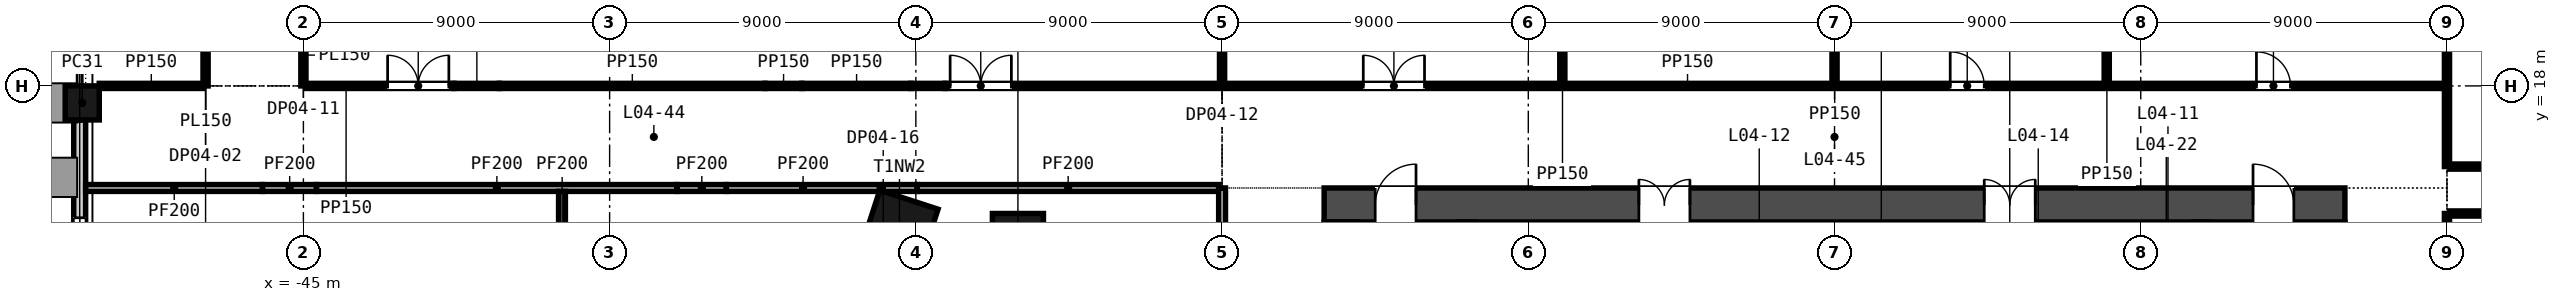
"""IFC4 building model, lengths in metres.
Left out: names, types, materials, properties, quantities, classifications, styles, units other than length and angle.
Written with IfcOpenShell. Run it as: python <this file> out.ifc"""

import sys

from ifc_helpers import new_model, si_unit, direction, frame, frame_2d, origin, origin_2d, place, context, subcontext, project, spatial, rectangle, extrude, element, fill, save


model = new_model("IFC4")
c1 = context("Model", 3, precision=1e-05, world=origin(), true_north=direction((0.0, 1.0)))
c2 = subcontext(c1, "Body", "Model", "MODEL_VIEW")
j1 = project(units=[si_unit("LENGTHUNIT", "METRE"), si_unit("PLANEANGLEUNIT", "RADIAN")], contexts=[c1])
p1 = place(None, origin())
s1 = spatial("IfcSite", under=j1, at=p1, CompositionType="ELEMENT")
p2 = place(p1, origin())
s2 = spatial("IfcBuilding", under=s1, at=p2, CompositionType="ELEMENT")
p3 = place(p2, frame((0.0, 0.0, 27.0)))
s3 = spatial("IfcBuildingStorey", under=s2, at=p3, CompositionType="ELEMENT", Elevation=27.0)
p4 = place(p3, frame((-15.0, 14.5, -0.3), z_axis=(0.0, 0.0, 1.0), x_axis=(1.0, 0.0, 0.0)))
e1 = element("IfcWall", 1, at=p4, inside=s3, PredefinedType="SOLIDWALL", context=c2, shape_type="SweptSolid", body=[
    extrude(rectangle(XDim=30.0, YDim=1.0, at=frame_2d((15.0, 0.0))), origin(), (0.0, 0.0, 1.0), 4.5),
])
p5 = place(p4, frame((9.25, 0.0, 0.3)))
e2 = element("IfcOpeningElement", 2, at=p5, cuts=e1, PredefinedType="OPENING", context=c2, shape_type="SweptSolid", body=[
    extrude(rectangle(XDim=1.5, YDim=2.1, at=frame_2d((0.75, 1.05))), frame((0.0, 0.51, 0.0), z_axis=(0.0, -1.0, 0.0), x_axis=(1.0, 0.0, 0.0)), (0.0, 0.0, 1.0), 1.02),
])
p6 = place(p4, frame((19.4, 0.0, 0.3)))
e3 = element("IfcOpeningElement", 3, at=p6, cuts=e1, PredefinedType="OPENING", context=c2, shape_type="SweptSolid", body=[
    extrude(rectangle(XDim=1.5, YDim=2.1, at=frame_2d((0.75, 1.05))), frame((0.0, 0.51, 0.0), z_axis=(0.0, -1.0, 0.0), x_axis=(1.0, 0.0, 0.0)), (0.0, 0.0, 1.0), 1.02),
])
p7 = place(p4, frame((1.5, 0.0, 0.3)))
e4 = element("IfcOpeningElement", 4, at=p7, cuts=e1, PredefinedType="OPENING", context=c2, shape_type="SweptSolid", body=[
    extrude(rectangle(XDim=1.2, YDim=2.1, at=frame_2d((0.6, 1.05))), frame((0.0, 0.51, 0.0), z_axis=(0.0, -1.0, 0.0), x_axis=(1.0, 0.0, 0.0)), (0.0, 0.0, 1.0), 1.02),
])
p8 = place(p4, frame((27.3, 0.0, 0.3)))
e5 = element("IfcOpeningElement", 5, at=p8, cuts=e1, PredefinedType="OPENING", context=c2, shape_type="SweptSolid", body=[
    extrude(rectangle(XDim=1.2, YDim=2.1, at=frame_2d((0.6, 1.05))), frame((0.0, 0.51, 0.0), z_axis=(0.0, -1.0, 0.0), x_axis=(1.0, 0.0, 0.0)), (0.0, 0.0, 1.0), 1.02),
])
p9 = place(p3, frame((-27.482, 13.799, -0.3), z_axis=(0.0, 0.0, 1.0), x_axis=(-0.309016994375, -0.951056516295, 0.0)))
e6 = element("IfcColumn", 6, at=p9, inside=s3, PredefinedType="COLUMN", context=c2, shape_type="SweptSolid", body=[
    extrude(rectangle(XDim=1.8, YDim=1.8, at=origin_2d()), origin(), (0.0, 0.0, 1.0), 4.5),
])
p10 = place(p3, frame((-24.0, 13.5, -0.3), z_axis=(0.0, 0.0, 1.0), x_axis=(1.0, 0.0, 0.0)))
e7 = element("IfcColumn", 7, at=p10, inside=s3, PredefinedType="COLUMN", context=c2, shape_type="SweptSolid", body=[
    extrude(rectangle(XDim=1.5, YDim=1.5, at=origin_2d()), origin(), (0.0, 0.0, 1.0), 4.5),
])
p11 = place(p3, frame((-51.5, 17.5, -0.3), z_axis=(0.0, 0.0, 1.0), x_axis=(0.0, -1.0, 0.0)))
e8 = element("IfcColumn", 8, at=p11, inside=s3, PredefinedType="COLUMN", context=c2, shape_type="SweptSolid", body=[
    extrude(rectangle(XDim=1.0, YDim=1.0, at=origin_2d()), origin(), (0.0, 0.0, 1.0), 4.5),
])
p12 = place(p3, frame((-51.575, 17.0, -0.3), z_axis=(0.0, 0.0, 1.0), x_axis=(0.0, -1.0, 0.0)))
e9 = element("IfcWall", 9, at=p12, inside=s3, PredefinedType="SOLIDWALL", context=c2, shape_type="SweptSolid", body=[
    extrude(rectangle(XDim=7.75, YDim=0.35, at=frame_2d((3.875, 0.0))), origin(), (0.0, 0.0, 1.0), 3.6),
])
p13 = place(p12, frame((2.875, 0.0, 1.2)))
e10 = element("IfcOpeningElement", 10, at=p13, cuts=e9, PredefinedType="OPENING", context=c2, shape_type="SweptSolid", body=[
    extrude(rectangle(XDim=2.0, YDim=2.35, at=frame_2d((1.0, 1.175))), frame((0.0, 0.185, 0.0), z_axis=(0.0, -1.0, 0.0), x_axis=(1.0, 0.0, 0.0)), (0.0, 0.0, 1.0), 0.37),
])
for number, where, z_axis, x_axis in (
    (11, (-8.275, 11.3, 0.0), (0.0, 0.0, 1.0), (0.0, 1.0, 0.0)),
    (12, (-5.875, 11.3, 0.0), (0.0, 0.0, 1.0), (0.0, 1.0, 0.0)),
    (13, (-4.125, 11.3, 0.0), (0.0, 0.0, 1.0), (0.0, 1.0, 0.0)),
    (14, (-1.325, 11.3, 0.0), (0.0, 0.0, 1.0), (0.0, 1.0, 0.0)),
    (15, (1.475, 11.3, 0.0), (0.0, 0.0, 1.0), (0.0, 1.0, 0.0)),
    (16, (4.275, 11.3, 0.0), (0.0, 0.0, 1.0), (0.0, 1.0, 0.0)),
    (17, (6.025, 11.3, 0.0), (0.0, 0.0, 1.0), (0.0, 1.0, 0.0)),
    (18, (8.825, 11.3, 0.0), (0.0, 0.0, 1.0), (0.0, 1.0, 0.0)),
):
    element("IfcWall", number, at=place(p3, frame(where, z_axis=z_axis, x_axis=x_axis)), inside=s3, PredefinedType="PARTITIONING", context=c2, shape_type="SweptSolid", body=[
        extrude(rectangle(XDim=2.7, YDim=0.25, at=frame_2d((1.35, 0.0))), origin(), (0.0, 0.0, 1.0), 4.2),
    ])
p14 = place(p3, frame((18.075, 14.25, 0.0), z_axis=(0.0, 0.0, 1.0), x_axis=(1.0, 0.0, 0.0)))
e19 = element("IfcWall", 19, at=p14, inside=s3, PredefinedType="PARTITIONING", context=c2, shape_type="SweptSolid", body=[
    extrude(rectangle(XDim=5.175, YDim=0.15, at=frame_2d((2.587, 0.0))), origin(), (0.0, 0.0, 1.0), 4.2),
])
p15 = place(p3, frame((-51.4, 15.0, 0.0), z_axis=(0.0, 0.0, 1.0), x_axis=(1.0, 0.0, 0.0)))
e20 = element("IfcWall", 20, at=p15, inside=s3, PredefinedType="PARTITIONING", context=c2, shape_type="SweptSolid", body=[
    extrude(rectangle(XDim=5.198, YDim=0.2, at=frame_2d((2.599, 0.0))), origin(), (0.0, 0.0, 1.0), 4.2),
])
p16 = place(p3, frame((-46.202, 15.0, 0.0), z_axis=(0.0, 0.0, 1.0), x_axis=(1.0, 0.0, 0.0)))
e21 = element("IfcWall", 21, at=p16, inside=s3, PredefinedType="PARTITIONING", context=c2, shape_type="SweptSolid", body=[
    extrude(rectangle(XDim=1.587, YDim=0.2, at=frame_2d((0.793, 0.0))), origin(), (0.0, 0.0, 1.0), 3.219),
])
p17 = place(p3, frame((-44.615, 15.0, 0.0), z_axis=(0.0, 0.0, 1.0), x_axis=(1.0, 0.0, 0.0)))
e22 = element("IfcWall", 22, at=p17, inside=s3, PredefinedType="PARTITIONING", context=c2, shape_type="SweptSolid", body=[
    extrude(rectangle(XDim=10.594, YDim=0.2, at=frame_2d((5.297, 0.0))), origin(), (0.0, 0.0, 1.0), 4.2),
])
p18 = place(p3, frame((-34.021, 15.0, 0.0), z_axis=(0.0, 0.0, 1.0), x_axis=(1.0, 0.0, 0.0)))
e23 = element("IfcWall", 23, at=p18, inside=s3, PredefinedType="PARTITIONING", context=c2, shape_type="SweptSolid", body=[
    extrude(rectangle(XDim=1.452, YDim=0.2, at=frame_2d((0.726, 0.0))), origin(), (0.0, 0.0, 1.0), 3.111),
])
p19 = place(p3, frame((-32.569, 15.0, 0.0), z_axis=(0.0, 0.0, 1.0), x_axis=(1.0, 0.0, 0.0)))
e24 = element("IfcWall", 24, at=p19, inside=s3, PredefinedType="PARTITIONING", context=c2, shape_type="SweptSolid", body=[
    extrude(rectangle(XDim=4.499, YDim=0.2, at=frame_2d((2.25, 0.0))), origin(), (0.0, 0.0, 1.0), 4.2),
])
p20 = place(p3, frame((-27.958, 15.0, 0.0), z_axis=(0.0, 0.0, 1.0), x_axis=(1.0, 0.0, 0.0)))
e25 = element("IfcWall", 25, at=p20, inside=s3, PredefinedType="PARTITIONING", context=c2, shape_type="SweptSolid", body=[
    extrude(rectangle(XDim=1.0, YDim=0.2, at=frame_2d((0.5, 0.0))), origin(), (0.0, 0.0, 1.0), 3.2),
])
p21 = place(p3, frame((-26.958, 15.0, 0.0), z_axis=(0.0, 0.0, 1.0), x_axis=(1.0, 0.0, 0.0)))
e26 = element("IfcWall", 26, at=p21, inside=s3, PredefinedType="PARTITIONING", context=c2, shape_type="SweptSolid", body=[
    extrude(rectangle(XDim=8.858, YDim=0.2, at=frame_2d((4.429, 0.0))), origin(), (0.0, 0.0, 1.0), 4.2),
])
p22 = place(p3, frame((18.075, 15.629, 0.0), z_axis=(0.0, 0.0, 1.0), x_axis=(1.0, 0.0, 0.0)))
e27 = element("IfcWall", 27, at=p22, inside=s3, PredefinedType="PARTITIONING", context=c2, shape_type="SweptSolid", body=[
    extrude(rectangle(XDim=7.482, YDim=0.15, at=frame_2d((3.741, 0.0))), origin(), (0.0, 0.0, 1.0), 4.2),
])
p23 = place(p3, frame((-51.0, 18.0, 0.0), z_axis=(0.0, 0.0, 1.0), x_axis=(1.0, 0.0, 0.0)))
e28 = element("IfcWall", 28, at=p23, inside=s3, PredefinedType="PARTITIONING", context=c2, shape_type="SweptSolid", body=[
    extrude(rectangle(XDim=3.05, YDim=0.15, at=frame_2d((1.525, 0.0))), origin(), (0.0, 0.0, 1.0), 4.2),
])
p24 = place(p3, frame((-44.925, 18.0, 0.0), z_axis=(0.0, 0.0, 1.0), x_axis=(1.0, 0.0, 0.0)))
e29 = element("IfcWall", 29, at=p24, inside=s3, PredefinedType="PARTITIONING", context=c2, shape_type="SweptSolid", body=[
    extrude(rectangle(XDim=4.353, YDim=0.15, at=frame_2d((2.176, 0.0))), origin(), (0.0, 0.0, 1.0), 4.2),
])
p25 = place(p24, frame((2.4, 0.0, 0.0)))
e30 = element("IfcOpeningElement", 30, at=p25, cuts=e29, PredefinedType="OPENING", context=c2, shape_type="SweptSolid", body=[
    extrude(rectangle(XDim=1.8, YDim=2.4, at=frame_2d((0.9, 1.2))), frame((0.0, 0.085, 0.0), z_axis=(0.0, -1.0, 0.0), x_axis=(1.0, 0.0, 0.0)), (0.0, 0.0, 1.0), 0.17),
])
p26 = place(p3, frame((-40.572, 18.0, 0.0), z_axis=(0.0, 0.0, 1.0), x_axis=(1.0, 0.0, 0.0)))
e31 = element("IfcWall", 31, at=p26, inside=s3, PredefinedType="PARTITIONING", context=c2, shape_type="SweptSolid", body=[
    extrude(rectangle(XDim=1.331, YDim=0.15, at=frame_2d((0.666, 0.0))), origin(), (0.0, 0.0, 1.0), 3.111),
])
p27 = place(p3, frame((-39.241, 18.0, 0.0), z_axis=(0.0, 0.0, 1.0), x_axis=(1.0, 0.0, 0.0)))
e32 = element("IfcWall", 32, at=p27, inside=s3, PredefinedType="PARTITIONING", context=c2, shape_type="SweptSolid", body=[
    extrude(rectangle(XDim=7.807, YDim=0.15, at=frame_2d((3.903, 0.0))), origin(), (0.0, 0.0, 1.0), 4.2),
])
p28 = place(p3, frame((-31.434, 18.0, 0.0), z_axis=(0.0, 0.0, 1.0), x_axis=(1.0, 0.0, 0.0)))
e33 = element("IfcWall", 33, at=p28, inside=s3, PredefinedType="PARTITIONING", context=c2, shape_type="SweptSolid", body=[
    extrude(rectangle(XDim=1.083, YDim=0.15, at=frame_2d((0.542, 0.0))), origin(), (0.0, 0.0, 1.0), 3.111),
])
p29 = place(p3, frame((-30.351, 18.0, 0.0), z_axis=(0.0, 0.0, 1.0), x_axis=(1.0, 0.0, 0.0)))
e34 = element("IfcWall", 34, at=p29, inside=s3, PredefinedType="PARTITIONING", context=c2, shape_type="SweptSolid", body=[
    extrude(rectangle(XDim=3.209, YDim=0.15, at=frame_2d((1.604, 0.0))), origin(), (0.0, 0.0, 1.0), 4.2),
])
p30 = place(p3, frame((-27.142, 18.0, 0.0), z_axis=(0.0, 0.0, 1.0), x_axis=(1.0, 0.0, 0.0)))
e35 = element("IfcWall", 35, at=p30, inside=s3, PredefinedType="PARTITIONING", context=c2, shape_type="SweptSolid", body=[
    extrude(rectangle(XDim=1.0, YDim=0.15, at=frame_2d((0.5, 0.0))), origin(), (0.0, 0.0, 1.0), 3.2),
])
p31 = place(p3, frame((-26.142, 18.0, 0.0), z_axis=(0.0, 0.0, 1.0), x_axis=(1.0, 0.0, 0.0)))
e36 = element("IfcWall", 36, at=p31, inside=s3, PredefinedType="PARTITIONING", context=c2, shape_type="SweptSolid", body=[
    extrude(rectangle(XDim=44.067, YDim=0.15, at=frame_2d((22.034, 0.0))), origin(), (0.0, 0.0, 1.0), 4.2),
])
p32 = place(p31, frame((0.15, 0.0, 0.0)))
e37 = element("IfcOpeningElement", 37, at=p32, cuts=e36, PredefinedType="OPENING", context=c2, shape_type="SweptSolid", body=[
    extrude(rectangle(XDim=1.8, YDim=2.4, at=frame_2d((0.9, 1.2))), frame((0.0, 0.085, 0.0), z_axis=(0.0, -1.0, 0.0), x_axis=(1.0, 0.0, 0.0)), (0.0, 0.0, 1.0), 0.17),
])
p33 = place(p31, frame((12.292, 0.0, 0.0)))
e38 = element("IfcOpeningElement", 38, at=p33, cuts=e36, PredefinedType="OPENING", context=c2, shape_type="SweptSolid", body=[
    extrude(rectangle(XDim=1.8, YDim=2.4, at=frame_2d((0.9, 1.2))), frame((0.0, 0.085, 0.0), z_axis=(0.0, -1.0, 0.0), x_axis=(1.0, 0.0, 0.0)), (0.0, 0.0, 1.0), 0.17),
])
p34 = place(p31, frame((29.542, 0.0, 0.0)))
e39 = element("IfcOpeningElement", 39, at=p34, cuts=e36, PredefinedType="OPENING", context=c2, shape_type="SweptSolid", body=[
    extrude(rectangle(XDim=1.0, YDim=2.1, at=frame_2d((0.5, 1.05))), frame((0.0, 0.085, 0.0), z_axis=(0.0, -1.0, 0.0), x_axis=(1.0, 0.0, 0.0)), (0.0, 0.0, 1.0), 0.17),
])
p35 = place(p31, frame((38.542, 0.0, 0.0)))
e40 = element("IfcOpeningElement", 40, at=p35, cuts=e36, PredefinedType="OPENING", context=c2, shape_type="SweptSolid", body=[
    extrude(rectangle(XDim=1.0, YDim=2.1, at=frame_2d((0.5, 1.05))), frame((0.0, 0.085, 0.0), z_axis=(0.0, -1.0, 0.0), x_axis=(1.0, 0.0, 0.0)), (0.0, 0.0, 1.0), 0.17),
])
p36 = place(p3, frame((-47.875, 18.0, 0.0), z_axis=(0.0, 0.0, 1.0), x_axis=(0.0, 1.0, 0.0)))
e41 = element("IfcWall", 41, at=p36, inside=s3, PredefinedType="PARTITIONING", context=c2, shape_type="SweptSolid", body=[
    extrude(rectangle(XDim=3.116, YDim=0.15, at=frame_2d((1.558, 0.0))), origin(), (0.0, 0.0, 1.0), 4.2),
])
p37 = place(p3, frame((-45.0, 18.0, 0.0), z_axis=(0.0, 0.0, 1.0), x_axis=(0.0, 1.0, 0.0)))
e42 = element("IfcWall", 42, at=p37, inside=s3, PredefinedType="PARTITIONING", context=c2, shape_type="SweptSolid", body=[
    extrude(rectangle(XDim=1.811, YDim=0.15, at=frame_2d((0.906, 0.0))), origin(), (0.0, 0.0, 1.0), 4.2),
])
p38 = place(p3, frame((-37.4, 12.851, 0.0), z_axis=(0.0, 0.0, 1.0), x_axis=(0.0, 1.0, 0.0)))
e43 = element("IfcWall", 43, at=p38, inside=s3, PredefinedType="PARTITIONING", context=c2, shape_type="SweptSolid", body=[
    extrude(rectangle(XDim=2.049, YDim=0.2, at=frame_2d((1.025, 0.0))), origin(), (0.0, 0.0, 1.0), 4.2),
])
p39 = place(p3, frame((-18.0, 1.251, 0.0), z_axis=(0.0, 0.0, 1.0), x_axis=(0.0, 1.0, 0.0)))
e44 = element("IfcWall", 44, at=p39, inside=s3, PredefinedType="PARTITIONING", context=c2, shape_type="SweptSolid", body=[
    extrude(rectangle(XDim=13.749, YDim=0.2, at=frame_2d((6.875, 0.0))), origin(), (0.0, 0.0, 1.0), 4.2),
])
p40 = place(p39, frame((6.4, 0.0, 0.0)))
e45 = element("IfcOpeningElement", 45, at=p40, cuts=e44, PredefinedType="OPENING", context=c2, shape_type="SweptSolid", body=[
    extrude(rectangle(XDim=1.0, YDim=2.1, at=frame_2d((0.5, 1.05))), frame((0.0, 0.11, 0.0), z_axis=(0.0, -1.0, 0.0), x_axis=(1.0, 0.0, 0.0)), (0.0, 0.0, 1.0), 0.22),
])
p41 = place(p3, frame((-18.0, 18.075, 0.0), z_axis=(0.0, 0.0, 1.0), x_axis=(0.0, 1.0, 0.0)))
e46 = element("IfcWall", 46, at=p41, inside=s3, PredefinedType="PARTITIONING", context=c2, shape_type="SweptSolid", body=[
    extrude(rectangle(XDim=13.025, YDim=0.15, at=frame_2d((6.513, 0.0))), origin(), (0.0, 0.0, 1.0), 4.2),
])
p42 = place(p41, frame((4.65, 0.0, 0.0)))
e47 = element("IfcOpeningElement", 47, at=p42, cuts=e46, PredefinedType="OPENING", context=c2, shape_type="SweptSolid", body=[
    extrude(rectangle(XDim=2.4, YDim=2.4, at=frame_2d((1.2, 1.2))), frame((0.0, 0.085, 0.0), z_axis=(0.0, -1.0, 0.0), x_axis=(1.0, 0.0, 0.0)), (0.0, 0.0, 1.0), 0.17),
])
p43 = place(p3, frame((-8.0, 18.075, 0.0), z_axis=(0.0, 0.0, 1.0), x_axis=(0.0, 1.0, 0.0)))
e48 = element("IfcWall", 48, at=p43, inside=s3, PredefinedType="PARTITIONING", context=c2, shape_type="SweptSolid", body=[
    extrude(rectangle(XDim=13.025, YDim=0.15, at=frame_2d((6.513, 0.0))), origin(), (0.0, 0.0, 1.0), 4.2),
])
p44 = place(p3, frame((0.0, 18.075, 0.0), z_axis=(0.0, 0.0, 1.0), x_axis=(0.0, 1.0, 0.0)))
e49 = element("IfcWall", 49, at=p44, inside=s3, PredefinedType="PARTITIONING", context=c2, shape_type="SweptSolid", body=[
    extrude(rectangle(XDim=8.175, YDim=0.15, at=frame_2d((4.087, 0.0))), origin(), (0.0, 0.0, 1.0), 3.521),
])
p45 = place(p3, frame((8.0, 18.075, 0.0), z_axis=(0.0, 0.0, 1.0), x_axis=(0.0, 1.0, 0.0)))
e50 = element("IfcWall", 50, at=p45, inside=s3, PredefinedType="PARTITIONING", context=c2, shape_type="SweptSolid", body=[
    extrude(rectangle(XDim=13.025, YDim=0.15, at=frame_2d((6.513, 0.0))), origin(), (0.0, 0.0, 1.0), 4.2),
])
p46 = place(p3, frame((18.0, 0.0, 0.0), z_axis=(0.0, 0.0, 1.0), x_axis=(0.0, 1.0, 0.0)))
e51 = element("IfcWall", 51, at=p46, inside=s3, PredefinedType="PARTITIONING", context=c2, shape_type="SweptSolid", body=[
    extrude(rectangle(XDim=14.25, YDim=0.15, at=frame_2d((7.125, 0.0))), origin(), (0.0, 0.0, 1.0), 4.2),
])
p47 = place(p46, frame((6.65, 0.0, 0.0)))
e52 = element("IfcOpeningElement", 52, at=p47, cuts=e51, PredefinedType="OPENING", context=c2, shape_type="SweptSolid", body=[
    extrude(rectangle(XDim=1.0, YDim=2.1, at=frame_2d((0.5, 1.05))), frame((0.0, 0.085, 0.0), z_axis=(0.0, -1.0, 0.0), x_axis=(1.0, 0.0, 0.0)), (0.0, 0.0, 1.0), 0.17),
])
p48 = place(p3, frame((18.0, 15.629, 0.0), z_axis=(0.0, 0.0, 1.0), x_axis=(0.0, 1.0, 0.0)))
e53 = element("IfcWall", 53, at=p48, inside=s3, PredefinedType="PARTITIONING", context=c2, shape_type="SweptSolid", body=[
    extrude(rectangle(XDim=9.85, YDim=0.15, at=frame_2d((4.925, 0.0))), origin(), (0.0, 0.0, 1.0), 4.2),
])
p49 = place(p13, origin())
e54 = element("IfcWindow", 54, at=p49, inside=s3, PartitioningType="SINGLE_PANEL", PredefinedType="WINDOW", context=c2, shape_type="SweptSolid", body=[
    extrude(rectangle(XDim=2.0, YDim=2.35, at=frame_2d((1.0, 1.175))), frame((0.0, 0.03, 0.0), z_axis=(0.0, -1.0, 0.0), x_axis=(1.0, 0.0, 0.0)), (0.0, 0.0, 1.0), 0.06),
])
fill(e10, e54)
p50 = place(p5, origin())
e55 = element("IfcDoor", 55, at=p50, inside=s3, OperationType="DOUBLE_DOOR_SINGLE_SWING", PredefinedType="DOOR", context=c2, shape_type="SweptSolid", body=[
    extrude(rectangle(XDim=1.5, YDim=2.1, at=frame_2d((0.75, 1.05))), frame((0.0, 0.025, 0.0), z_axis=(0.0, -1.0, 0.0), x_axis=(1.0, 0.0, 0.0)), (0.0, 0.0, 1.0), 0.05),
])
fill(e2, e55)
p51 = place(p6, origin())
e56 = element("IfcDoor", 56, at=p51, inside=s3, OperationType="DOUBLE_DOOR_SINGLE_SWING", PredefinedType="DOOR", context=c2, shape_type="SweptSolid", body=[
    extrude(rectangle(XDim=1.5, YDim=2.1, at=frame_2d((0.75, 1.05))), frame((0.0, 0.025, 0.0), z_axis=(0.0, -1.0, 0.0), x_axis=(1.0, 0.0, 0.0)), (0.0, 0.0, 1.0), 0.05),
])
fill(e3, e56)
p52 = place(p7, origin())
e57 = element("IfcDoor", 57, at=p52, inside=s3, OperationType="SINGLE_SWING_RIGHT", PredefinedType="DOOR", context=c2, shape_type="SweptSolid", body=[
    extrude(rectangle(XDim=1.2, YDim=2.1, at=frame_2d((0.6, 1.05))), frame((0.0, 0.025, 0.0), z_axis=(0.0, -1.0, 0.0), x_axis=(1.0, 0.0, 0.0)), (0.0, 0.0, 1.0), 0.05),
])
fill(e4, e57)
p53 = place(p8, origin())
e58 = element("IfcDoor", 58, at=p53, inside=s3, OperationType="SINGLE_SWING_LEFT", PredefinedType="DOOR", context=c2, shape_type="SweptSolid", body=[
    extrude(rectangle(XDim=1.2, YDim=2.1, at=frame_2d((0.6, 1.05))), frame((0.0, 0.025, 0.0), z_axis=(0.0, -1.0, 0.0), x_axis=(1.0, 0.0, 0.0)), (0.0, 0.0, 1.0), 0.05),
])
fill(e5, e58)
p54 = place(p25, origin())
e59 = element("IfcDoor", 59, at=p54, inside=s3, OperationType="SINGLE_SWING_LEFT", PredefinedType="DOOR", context=c2, shape_type="SweptSolid", body=[
    extrude(rectangle(XDim=1.8, YDim=2.4, at=frame_2d((0.9, 1.2))), frame((0.0, 0.025, 0.0), z_axis=(0.0, -1.0, 0.0), x_axis=(1.0, 0.0, 0.0)), (0.0, 0.0, 1.0), 0.05),
])
fill(e30, e59)
p55 = place(p32, origin())
e60 = element("IfcDoor", 60, at=p55, inside=s3, OperationType="SINGLE_SWING_LEFT", PredefinedType="DOOR", context=c2, shape_type="SweptSolid", body=[
    extrude(rectangle(XDim=1.8, YDim=2.4, at=frame_2d((0.9, 1.2))), frame((0.0, 0.025, 0.0), z_axis=(0.0, -1.0, 0.0), x_axis=(1.0, 0.0, 0.0)), (0.0, 0.0, 1.0), 0.05),
])
fill(e37, e60)
p56 = place(p33, origin())
e61 = element("IfcDoor", 61, at=p56, inside=s3, OperationType="SINGLE_SWING_LEFT", PredefinedType="DOOR", context=c2, shape_type="SweptSolid", body=[
    extrude(rectangle(XDim=1.8, YDim=2.4, at=frame_2d((0.9, 1.2))), frame((0.0, 0.025, 0.0), z_axis=(0.0, -1.0, 0.0), x_axis=(1.0, 0.0, 0.0)), (0.0, 0.0, 1.0), 0.05),
])
fill(e38, e61)
p57 = place(p34, origin())
e62 = element("IfcDoor", 62, at=p57, inside=s3, OperationType="SINGLE_SWING_LEFT", PredefinedType="DOOR", context=c2, shape_type="SweptSolid", body=[
    extrude(rectangle(XDim=1.0, YDim=2.1, at=frame_2d((0.5, 1.05))), frame((0.0, 0.025, 0.0), z_axis=(0.0, -1.0, 0.0), x_axis=(1.0, 0.0, 0.0)), (0.0, 0.0, 1.0), 0.05),
])
fill(e39, e62)
p58 = place(p35, origin())
e63 = element("IfcDoor", 63, at=p58, inside=s3, OperationType="SINGLE_SWING_LEFT", PredefinedType="DOOR", context=c2, shape_type="SweptSolid", body=[
    extrude(rectangle(XDim=1.0, YDim=2.1, at=frame_2d((0.5, 1.05))), frame((0.0, 0.025, 0.0), z_axis=(0.0, -1.0, 0.0), x_axis=(1.0, 0.0, 0.0)), (0.0, 0.0, 1.0), 0.05),
])
fill(e40, e63)
save(model, sys.argv[1])
